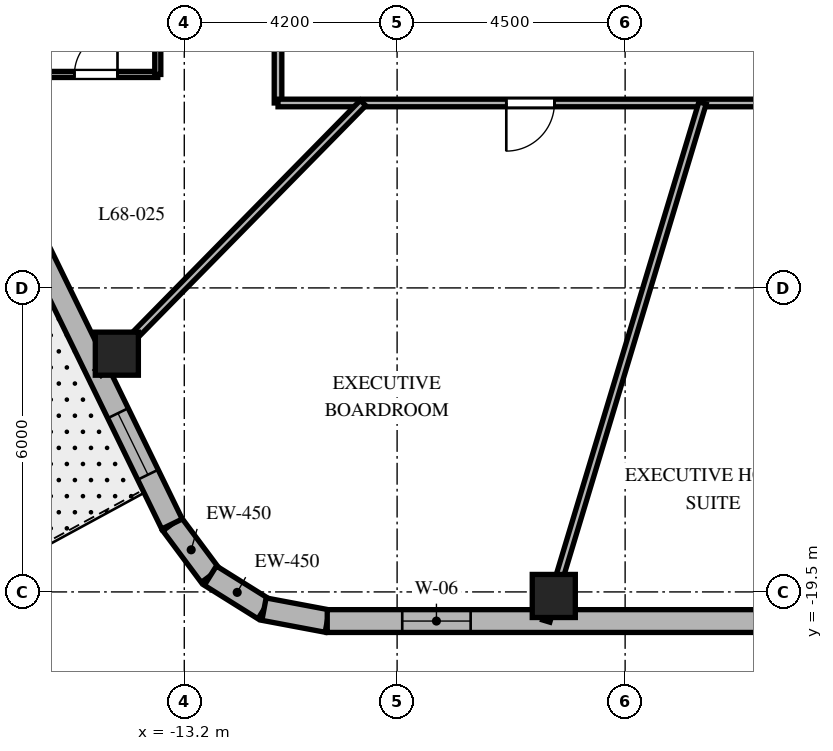
"""IFC4 building model, lengths in metres.
Left out: names, types, materials, properties, quantities, classifications, styles, units other than length and angle.
Written with IfcOpenShell. Run it as: python <this file> out.ifc"""

import sys

from ifc_helpers import new_model, si_unit, direction, frame, frame_2d, origin, origin_2d, place, context, subcontext, project, spatial, rectangle, extrude, element, fill, save


model = new_model("IFC4")
c1 = context("Model", 3, precision=1e-05, world=origin(), true_north=direction((0.0, 1.0)))
c2 = subcontext(c1, "Body", "Model", "MODEL_VIEW")
j1 = project(units=[si_unit("LENGTHUNIT", "METRE"), si_unit("PLANEANGLEUNIT", "RADIAN")], contexts=[c1])
p1 = place(None, origin())
s1 = spatial("IfcSite", under=j1, at=p1, CompositionType="ELEMENT")
p2 = place(p1, origin())
s2 = spatial("IfcBuilding", under=s1, at=p2, CompositionType="ELEMENT")
p3 = place(p2, frame((0.0, 0.0, 273.0)))
s3 = spatial("IfcBuildingStorey", under=s2, at=p3, CompositionType="ELEMENT", Elevation=273.0)
for number, where, z_axis, x_axis in (
    (1, (-5.908, -19.58, 0.0), (0.0, 0.0, 1.0), (1.0, 0.0, 0.0)),
    (2, (-14.531, -14.798, 0.0), (0.0, 0.0, 1.0), (1.0, 0.0, 0.0)),
):
    element("IfcColumn", number, at=place(p3, frame(where, z_axis=z_axis, x_axis=x_axis)), inside=s3, PredefinedType="COLUMN", context=c2, shape_type="SweptSolid", body=[
        extrude(rectangle(XDim=0.85, YDim=0.85, at=origin_2d()), origin(), (0.0, 0.0, 1.0), 3.9),
    ])
p4 = place(p3, frame((-13.443, -18.16, 0.0), z_axis=(0.0, 0.0, 1.0), x_axis=(0.597042425808, -0.802209661987, 0.0)))
e3 = element("IfcWall", 3, at=p4, inside=s3, PredefinedType="SOLIDWALL", context=c2, shape_type="SweptSolid", body=[
    extrude(rectangle(XDim=1.27, YDim=0.45, at=frame_2d((0.635, 0.0))), origin(), (0.0, 0.0, 1.0), 3.6),
])
p5 = place(p3, frame((-12.685, -19.178, 0.0), z_axis=(0.0, 0.0, 1.0), x_axis=(0.848031272749, -0.529946186362, 0.0)))
e4 = element("IfcWall", 4, at=p5, inside=s3, PredefinedType="SOLIDWALL", context=c2, shape_type="SweptSolid", body=[
    extrude(rectangle(XDim=1.248, YDim=0.45, at=frame_2d((0.624, 0.0))), origin(), (0.0, 0.0, 1.0), 3.6),
])
p6 = place(p3, frame((-11.626, -19.84, 0.0), z_axis=(0.0, 0.0, 1.0), x_axis=(0.982701956681, -0.185194126083, 0.0)))
e5 = element("IfcWall", 5, at=p6, inside=s3, PredefinedType="SOLIDWALL", context=c2, shape_type="SweptSolid", body=[
    extrude(rectangle(XDim=1.27, YDim=0.45, at=frame_2d((0.635, 0.0))), origin(), (0.0, 0.0, 1.0), 3.6),
])
p7 = place(p3, frame((-10.379, -20.075, 0.0), z_axis=(0.0, 0.0, 1.0), x_axis=(1.0, 0.0, 0.0)))
e6 = element("IfcWall", 6, at=p7, inside=s3, PredefinedType="SOLIDWALL", context=c2, shape_type="SweptSolid", body=[
    extrude(rectangle(XDim=22.417, YDim=0.45, at=frame_2d((11.208, 0.0))), origin(), (0.0, 0.0, 1.0), 3.6),
])
p8 = place(p7, frame((1.48, 0.0, 0.8)))
e7 = element("IfcOpeningElement", 7, at=p8, cuts=e6, PredefinedType="OPENING", context=c2, shape_type="SweptSolid", body=[
    extrude(rectangle(XDim=1.35, YDim=1.75, at=frame_2d((0.675, 0.875))), frame((0.0, 0.235, 0.0), z_axis=(0.0, -1.0, 0.0), x_axis=(1.0, 0.0, 0.0)), (0.0, 0.0, 1.0), 0.47),
])
p9 = place(p7, frame((10.534, 0.0, 0.8)))
e8 = element("IfcOpeningElement", 8, at=p9, cuts=e6, PredefinedType="OPENING", context=c2, shape_type="SweptSolid", body=[
    extrude(rectangle(XDim=1.35, YDim=1.75, at=frame_2d((0.675, 0.875))), frame((0.0, 0.235, 0.0), z_axis=(0.0, -1.0, 0.0), x_axis=(1.0, 0.0, 0.0)), (0.0, 0.0, 1.0), 0.47),
])
p10 = place(p7, frame((19.587, 0.0, 0.8)))
e9 = element("IfcOpeningElement", 9, at=p10, cuts=e6, PredefinedType="OPENING", context=c2, shape_type="SweptSolid", body=[
    extrude(rectangle(XDim=1.35, YDim=1.75, at=frame_2d((0.675, 0.875))), frame((0.0, 0.235, 0.0), z_axis=(0.0, -1.0, 0.0), x_axis=(1.0, 0.0, 0.0)), (0.0, 0.0, 1.0), 0.47),
])
p11 = place(p3, frame((-21.138, -2.371, 0.0), z_axis=(0.0, 0.0, 1.0), x_axis=(0.438128124058, -0.89891253574, 0.0)))
e10 = element("IfcWall", 10, at=p11, inside=s3, PredefinedType="SOLIDWALL", context=c2, shape_type="SweptSolid", body=[
    extrude(rectangle(XDim=17.565, YDim=0.45, at=frame_2d((8.782, 0.0))), origin(), (0.0, 0.0, 1.0), 3.6),
])
p12 = place(p11, frame((4.769, 0.0, 0.0)))
e11 = element("IfcOpeningElement", 11, at=p12, cuts=e10, PredefinedType="OPENING", context=c2, shape_type="SweptSolid", body=[
    extrude(rectangle(XDim=0.95, YDim=2.15, at=frame_2d((0.475, 1.075))), frame((0.0, 0.235, 0.0), z_axis=(0.0, -1.0, 0.0), x_axis=(1.0, 0.0, 0.0)), (0.0, 0.0, 1.0), 0.47),
])
p13 = place(p11, frame((1.133, 0.0, 0.8)))
e12 = element("IfcOpeningElement", 12, at=p13, cuts=e10, PredefinedType="OPENING", context=c2, shape_type="SweptSolid", body=[
    extrude(rectangle(XDim=1.35, YDim=1.75, at=frame_2d((0.675, 0.875))), frame((0.0, 0.235, 0.0), z_axis=(0.0, -1.0, 0.0), x_axis=(1.0, 0.0, 0.0)), (0.0, 0.0, 1.0), 0.47),
])
p14 = place(p11, frame((8.158, 0.0, 0.8)))
e13 = element("IfcOpeningElement", 13, at=p14, cuts=e10, PredefinedType="OPENING", context=c2, shape_type="SweptSolid", body=[
    extrude(rectangle(XDim=1.35, YDim=1.75, at=frame_2d((0.675, 0.875))), frame((0.0, 0.235, 0.0), z_axis=(0.0, -1.0, 0.0), x_axis=(1.0, 0.0, 0.0)), (0.0, 0.0, 1.0), 0.47),
])
p15 = place(p11, frame((15.132, 0.0, 0.8)))
e14 = element("IfcOpeningElement", 14, at=p15, cuts=e10, PredefinedType="OPENING", context=c2, shape_type="SweptSolid", body=[
    extrude(rectangle(XDim=1.35, YDim=1.75, at=frame_2d((0.675, 0.875))), frame((0.0, 0.235, 0.0), z_axis=(0.0, -1.0, 0.0), x_axis=(1.0, 0.0, 0.0)), (0.0, 0.0, 1.0), 0.47),
])
p16 = place(p3, frame((-11.35, -9.85, 0.0), z_axis=(0.0, 0.0, 1.0), x_axis=(0.0, 1.0, 0.0)))
e15 = element("IfcWall", 15, at=p16, inside=s3, PredefinedType="PARTITIONING", context=c2, shape_type="SweptSolid", body=[
    extrude(rectangle(XDim=12.4, YDim=0.15, at=frame_2d((6.2, 0.0))), origin(), (0.0, 0.0, 1.0), 3.09),
])
p17 = place(p16, frame((8.835, 0.0, 0.0)))
e16 = element("IfcOpeningElement", 16, at=p17, cuts=e15, PredefinedType="OPENING", context=c2, shape_type="SweptSolid", body=[
    extrude(rectangle(XDim=0.95, YDim=2.03, at=frame_2d((0.475, 1.015))), frame((0.0, 0.085, 0.0), z_axis=(0.0, -1.0, 0.0), x_axis=(1.0, 0.0, 0.0)), (0.0, 0.0, 1.0), 0.17),
])
p18 = place(p16, frame((2.998, 0.0, 0.0)))
e17 = element("IfcOpeningElement", 17, at=p18, cuts=e15, PredefinedType="OPENING", context=c2, shape_type="SweptSolid", body=[
    extrude(rectangle(XDim=0.95, YDim=2.03, at=frame_2d((0.475, 1.015))), frame((0.0, 0.085, 0.0), z_axis=(0.0, -1.0, 0.0), x_axis=(1.0, 0.0, 0.0)), (0.0, 0.0, 1.0), 0.17),
])
p19 = place(p3, frame((-0.92, -9.85, 0.0), z_axis=(0.0, 0.0, 1.0), x_axis=(-1.0, 0.0, 0.0)))
e18 = element("IfcWall", 18, at=p19, inside=s3, PredefinedType="PARTITIONING", context=c2, shape_type="SweptSolid", body=[
    extrude(rectangle(XDim=10.43, YDim=0.15, at=frame_2d((5.215, 0.0))), origin(), (0.0, 0.0, 1.0), 3.09),
])
p20 = place(p19, frame((4.975, 0.0, 0.0)))
e19 = element("IfcOpeningElement", 19, at=p20, cuts=e18, PredefinedType="OPENING", context=c2, shape_type="SweptSolid", body=[
    extrude(rectangle(XDim=0.95, YDim=2.03, at=frame_2d((0.475, 1.015))), frame((0.0, 0.085, 0.0), z_axis=(0.0, -1.0, 0.0), x_axis=(1.0, 0.0, 0.0)), (0.0, 0.0, 1.0), 0.17),
])
p21 = place(p3, frame((-9.672, -9.85, 0.0), z_axis=(0.0, 0.0, 1.0), x_axis=(-0.700629771301, -0.713524998558, 0.0)))
e20 = element("IfcWall", 20, at=p21, inside=s3, PredefinedType="PARTITIONING", context=c2, shape_type="SweptSolid", body=[
    extrude(rectangle(XDim=7.459, YDim=0.15, at=frame_2d((3.73, 0.0))), origin(), (0.0, 0.0, 1.0), 2.94),
])
p22 = place(p3, frame((-2.972, -9.85, 0.0), z_axis=(0.0, 0.0, 1.0), x_axis=(-0.288872169679, -0.957367677324, 0.0)))
e21 = element("IfcWall", 21, at=p22, inside=s3, PredefinedType="PARTITIONING", context=c2, shape_type="SweptSolid", body=[
    extrude(rectangle(XDim=10.68, YDim=0.15, at=frame_2d((5.34, 0.0))), origin(), (0.0, 0.0, 1.0), 2.94),
])
p23 = place(p3, frame((-16.163, -9.287, 0.0), z_axis=(0.0, 0.0, 1.0), x_axis=(1.0, 0.0, 0.0)))
e22 = element("IfcWall", 22, at=p23, inside=s3, PredefinedType="PARTITIONING", context=c2, shape_type="SweptSolid", body=[
    extrude(rectangle(XDim=2.44, YDim=0.12, at=frame_2d((1.22, 0.0))), origin(), (0.0, 0.0, 1.0), 3.126),
])
p24 = place(p23, frame((0.795, 0.0, 0.0)))
e23 = element("IfcOpeningElement", 23, at=p24, cuts=e22, PredefinedType="OPENING", context=c2, shape_type="SweptSolid", body=[
    extrude(rectangle(XDim=0.85, YDim=2.03, at=frame_2d((0.425, 1.015))), frame((0.0, 0.07, 0.0), z_axis=(0.0, -1.0, 0.0), x_axis=(1.0, 0.0, 0.0)), (0.0, 0.0, 1.0), 0.14),
])
p25 = place(p3, frame((-13.723, -9.287, 0.0), z_axis=(0.0, 0.0, 1.0), x_axis=(0.0, 1.0, 0.0)))
e24 = element("IfcWall", 24, at=p25, inside=s3, PredefinedType="PARTITIONING", context=c2, shape_type="SweptSolid", body=[
    extrude(rectangle(XDim=2.61, YDim=0.12, at=frame_2d((1.305, 0.0))), origin(), (0.0, 0.0, 1.0), 3.6),
])
p26 = place(p8, origin())
e25 = element("IfcWindow", 25, at=p26, inside=s3, PartitioningType="SINGLE_PANEL", PredefinedType="WINDOW", context=c2, shape_type="SweptSolid", body=[
    extrude(rectangle(XDim=1.35, YDim=1.75, at=frame_2d((0.675, 0.875))), frame((0.0, 0.03, 0.0), z_axis=(0.0, -1.0, 0.0), x_axis=(1.0, 0.0, 0.0)), (0.0, 0.0, 1.0), 0.06),
])
fill(e7, e25)
p27 = place(p15, origin())
e26 = element("IfcWindow", 26, at=p27, inside=s3, PartitioningType="SINGLE_PANEL", PredefinedType="WINDOW", context=c2, shape_type="SweptSolid", body=[
    extrude(rectangle(XDim=1.35, YDim=1.75, at=frame_2d((0.675, 0.875))), frame((0.0, 0.03, 0.0), z_axis=(0.0, -1.0, 0.0), x_axis=(1.0, 0.0, 0.0)), (0.0, 0.0, 1.0), 0.06),
])
fill(e14, e26)
p28 = place(p24, origin())
e27 = element("IfcDoor", 27, at=p28, inside=s3, OperationType="SINGLE_SWING_RIGHT", PredefinedType="DOOR", context=c2, shape_type="SweptSolid", body=[
    extrude(rectangle(XDim=0.85, YDim=2.03, at=frame_2d((0.425, 1.015))), frame((0.0, 0.025, 0.0), z_axis=(0.0, -1.0, 0.0), x_axis=(1.0, 0.0, 0.0)), (0.0, 0.0, 1.0), 0.05),
])
fill(e23, e27)
p29 = place(p20, origin())
e28 = element("IfcDoor", 28, at=p29, inside=s3, OperationType="SINGLE_SWING_RIGHT", PredefinedType="DOOR", context=c2, shape_type="SweptSolid", body=[
    extrude(rectangle(XDim=0.95, YDim=2.03, at=frame_2d((0.475, 1.015))), frame((0.0, 0.025, 0.0), z_axis=(0.0, -1.0, 0.0), x_axis=(1.0, 0.0, 0.0)), (0.0, 0.0, 1.0), 0.05),
])
fill(e19, e28)
save(model, sys.argv[1])
